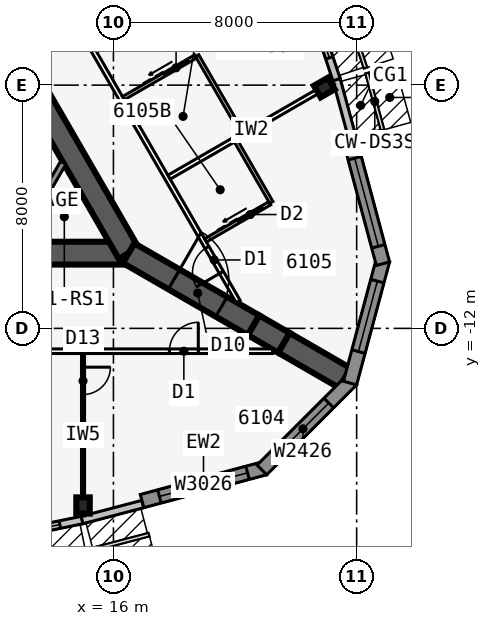
"""IFC4 building model, lengths in metres.
Left out: names, types, materials, properties, quantities, classifications, styles, units other than length and angle.
Written with IfcOpenShell. Run it as: python <this file> out.ifc"""

import sys

from ifc_helpers import new_model, si_unit, direction, frame, frame_2d, origin, origin_2d, place, context, subcontext, project, spatial, polyline, rectangle, i_section, outline, extrude, element, fill, save


model = new_model("IFC4")
c1 = context("Model", 3, precision=1e-05, world=origin(), true_north=direction((0.0, 1.0)))
c2 = subcontext(c1, "Body", "Model", "MODEL_VIEW")
j1 = project(units=[si_unit("LENGTHUNIT", "METRE"), si_unit("PLANEANGLEUNIT", "RADIAN")], contexts=[c1])
p1 = place(None, origin())
s1 = spatial("IfcSite", under=j1, at=p1, CompositionType="ELEMENT")
p2 = place(p1, origin())
s2 = spatial("IfcBuilding", under=s1, at=p2, CompositionType="ELEMENT")
p3 = place(p2, frame((0.0, 0.0, 229.7)))
s3 = spatial("IfcBuildingStorey", under=s2, at=p3, CompositionType="ELEMENT", Elevation=229.7)
p4 = place(p3, frame((-16.5, -9.526, 0.0), z_axis=(0.0, 0.0, 1.0), x_axis=(1.0, 0.0, 0.0)))
e1 = element("IfcWall", 1, at=p4, inside=s3, PredefinedType="SHEAR", context=c2, shape_type="SweptSolid", body=[
    extrude(rectangle(XDim=33.0, YDim=0.75, at=frame_2d((16.5, 0.0))), origin(), (0.0, 0.0, 1.0), 3.6),
])
p5 = place(p4, frame((14.05, 0.0, 0.0)))
e2 = element("IfcOpeningElement", 2, at=p5, cuts=e1, PredefinedType="OPENING", context=c2, shape_type="SweptSolid", body=[
    extrude(rectangle(XDim=1.8, YDim=2.13, at=frame_2d((0.9, 1.065))), frame((0.0, 0.385, 0.0), z_axis=(0.0, -1.0, 0.0), x_axis=(1.0, 0.0, 0.0)), (0.0, 0.0, 1.0), 0.77),
])
p6 = place(p3, frame((16.5, -9.526, 0.0), z_axis=(0.0, 0.0, 1.0), x_axis=(-0.499999749417, 0.866025548458, 0.0)))
e3 = element("IfcWall", 3, at=p6, inside=s3, PredefinedType="SHEAR", context=c2, shape_type="SweptSolid", body=[
    extrude(rectangle(XDim=33.0, YDim=0.75, at=frame_2d((16.5, 0.0))), origin(), (0.0, 0.0, 1.0), 3.6),
])
p7 = place(p6, frame((14.15, 0.0, 0.0)))
e4 = element("IfcOpeningElement", 4, at=p7, cuts=e3, PredefinedType="OPENING", context=c2, shape_type="SweptSolid", body=[
    extrude(rectangle(XDim=1.8, YDim=2.13, at=frame_2d((0.9, 1.065))), frame((0.0, 0.385, 0.0), z_axis=(0.0, -1.0, 0.0), x_axis=(1.0, 0.0, 0.0)), (0.0, 0.0, 1.0), 0.77),
])
p8 = place(p6, frame((12.6, 0.0, 0.0)))
e5 = element("IfcOpeningElement", 5, at=p8, cuts=e3, PredefinedType="OPENING", context=c2, shape_type="SweptSolid", body=[
    extrude(rectangle(XDim=1.0, YDim=2.13, at=frame_2d((0.5, 1.065))), frame((0.0, 0.385, 0.0), z_axis=(0.0, -1.0, 0.0), x_axis=(1.0, 0.0, 0.0)), (0.0, 0.0, 1.0), 0.77),
])
p9 = place(p3, frame((16.5, -9.526, 0.0), z_axis=(0.0, 0.0, 1.0), x_axis=(0.866031398331, -0.499989616998, 0.0)))
e6 = element("IfcWall", 6, at=p9, inside=s3, PredefinedType="SHEAR", context=c2, shape_type="SweptSolid", body=[
    extrude(rectangle(XDim=4.746, YDim=0.75, at=frame_2d((2.373, 0.0))), origin(), (0.0, 0.0, 1.0), 3.6),
])
p10 = place(p9, frame((1.725, 0.0, 0.0)))
e7 = element("IfcOpeningElement", 7, at=p10, cuts=e6, PredefinedType="OPENING", context=c2, shape_type="SweptSolid", body=[
    extrude(rectangle(XDim=1.8, YDim=2.13, at=frame_2d((0.9, 1.065))), frame((0.0, 0.385, 0.0), z_axis=(0.0, -1.0, 0.0), x_axis=(1.0, 0.0, 0.0)), (0.0, 0.0, 1.0), 0.77),
])
p11 = place(p3, frame((20.61, -11.899, 0.0), z_axis=(0.0, 0.0, 1.0), x_axis=(0.866009537788, -0.500027479704, 0.0)))
e8 = element("IfcWall", 8, at=p11, inside=s3, PredefinedType="SHEAR", context=c2, shape_type="SweptSolid", body=[
    extrude(rectangle(XDim=1.155, YDim=0.75, at=frame_2d((0.577, 0.0))), origin(), (0.0, 0.0, 1.0), 3.6),
])
p12 = place(p3, frame((21.61, -12.477, 0.0), z_axis=(0.0, 0.0, 1.0), x_axis=(0.866055313784, -0.499948190782, 0.0)))
e9 = element("IfcWall", 9, at=p12, inside=s3, PredefinedType="SHEAR", context=c2, shape_type="SweptSolid", body=[
    extrude(rectangle(XDim=2.309, YDim=0.75, at=frame_2d((1.155, 0.0))), origin(), (0.0, 0.0, 1.0), 3.6),
])
for number, where, z_axis, x_axis in (
    (10, (15.0, -17.825, 0.0), (0.0, 0.0, 1.0), (1.0, 0.0, 0.0)),
    (11, (22.937, -4.078, 0.0), (0.0, 0.0, 1.0), (-0.5, 0.866, 0.0)),
):
    element("IfcColumn", number, at=place(p3, frame(where, z_axis=z_axis, x_axis=x_axis)), inside=s3, PredefinedType="COLUMN", context=c2, shape_type="SweptSolid", body=[
        extrude(i_section(OverallWidth=0.442, OverallDepth=0.531, WebThickness=0.066, FlangeThickness=0.106, at=origin_2d()), origin(), (0.0, 0.0, 1.0), 3.6),
    ])
p13 = place(p3, frame((9.975, -19.332, 0.0), z_axis=(0.0, 0.0, 1.0), x_axis=(0.979461488189, 0.201631329795, 0.0)))
e12 = element("IfcWall", 12, at=p13, inside=s3, PredefinedType="STANDARD", context=c2, shape_type="SweptSolid", body=[
    extrude(rectangle(XDim=5.105, YDim=0.25, at=frame_2d((2.552, 0.0))), origin(), (0.0, 0.0, 1.0), 3.35),
])
p14 = place(p13, frame((0.752, 0.0, 0.45)))
e13 = element("IfcOpeningElement", 13, at=p14, cuts=e12, PredefinedType="OPENING", context=c2, shape_type="SweptSolid", body=[
    extrude(rectangle(XDim=3.6, YDim=2.6, at=frame_2d((1.8, 1.3))), frame((0.0, 0.135, 0.0), z_axis=(0.0, -1.0, 0.0), x_axis=(1.0, 0.0, 0.0)), (0.0, 0.0, 1.0), 0.27),
])
p15 = place(p3, frame((14.968, -18.304, 0.0), z_axis=(0.0, 0.0, 1.0), x_axis=(0.967010286052, 0.254737328772, 0.0)))
e14 = element("IfcWall", 14, at=p15, inside=s3, PredefinedType="STANDARD", context=c2, shape_type="SweptSolid", body=[
    extrude(rectangle(XDim=2.068, YDim=0.25, at=frame_2d((1.034, 0.0))), origin(), (0.0, 0.0, 1.0), 3.35),
])
p16 = place(p3, frame((16.942, -17.681, 0.0), z_axis=(0.0, 0.0, 1.0), x_axis=(0.965920442324, 0.258839137498, 0.0)))
e15 = element("IfcWall", 15, at=p16, inside=s3, PredefinedType="SOLIDWALL", context=c2, shape_type="SweptSolid", body=[
    extrude(rectangle(XDim=4.184, YDim=0.45, at=frame_2d((2.092, 0.0))), origin(), (0.0, 0.0, 1.0), 3.35),
])
p17 = place(p16, frame((0.592, 0.0, 0.45)))
e16 = element("IfcOpeningElement", 16, at=p17, cuts=e15, PredefinedType="OPENING", context=c2, shape_type="SweptSolid", body=[
    extrude(rectangle(XDim=3.0, YDim=2.6, at=frame_2d((1.5, 1.3))), frame((0.0, 0.235, 0.0), z_axis=(0.0, -1.0, 0.0), x_axis=(1.0, 0.0, 0.0)), (0.0, 0.0, 1.0), 0.47),
])
p18 = place(p3, frame((20.882, -16.656, 0.0), z_axis=(0.0, 0.0, 1.0), x_axis=(0.707077605902, 0.707135955267, 0.0)))
e17 = element("IfcWall", 17, at=p18, inside=s3, PredefinedType="SOLIDWALL", context=c2, shape_type="SweptSolid", body=[
    extrude(outline(polyline([(4.184, 0.225), (4.125, 0.225), (3.705, 0.113), (3.675, 0.225), (0.0, 0.225), (0.0, -0.225), (4.184, -0.225), (4.184, 0.225)])), origin(), (0.0, 0.0, 1.0), 3.35),
])
p19 = place(p18, frame((0.713, 0.0, 0.45)))
e18 = element("IfcOpeningElement", 18, at=p19, cuts=e17, PredefinedType="OPENING", context=c2, shape_type="SweptSolid", body=[
    extrude(rectangle(XDim=2.4, YDim=2.6, at=frame_2d((1.2, 1.3))), frame((0.0, 0.235, 0.0), z_axis=(0.0, -1.0, 0.0), x_axis=(1.0, 0.0, 0.0)), (0.0, 0.0, 1.0), 0.47),
])
p20 = place(p3, frame((23.783, -13.798, 0.0), z_axis=(0.0, 0.0, 1.0), x_axis=(0.258799282522, 0.96593112144, 0.0)))
e19 = element("IfcWall", 19, at=p20, inside=s3, PredefinedType="SOLIDWALL", context=c2, shape_type="SweptSolid", body=[
    extrude(outline(polyline([(4.184, 0.225), (0.509, 0.225), (0.479, 0.113), (0.059, 0.225), (0.0, 0.225), (0.0, -0.225), (4.184, -0.225), (4.184, 0.225)])), origin(), (0.0, 0.0, 1.0), 3.35),
])
p21 = place(p20, frame((1.071, 0.0, 0.45)))
e20 = element("IfcOpeningElement", 20, at=p21, cuts=e19, PredefinedType="OPENING", context=c2, shape_type="SweptSolid", body=[
    extrude(rectangle(XDim=2.4, YDim=2.6, at=frame_2d((1.2, 1.3))), frame((0.0, 0.235, 0.0), z_axis=(0.0, -1.0, 0.0), x_axis=(1.0, 0.0, 0.0)), (0.0, 0.0, 1.0), 0.47),
])
p22 = place(p3, frame((24.865, -9.873, 0.0), z_axis=(0.0, 0.0, 1.0), x_axis=(-0.258784695888, 0.965935029479, 0.0)))
e21 = element("IfcWall", 21, at=p22, inside=s3, PredefinedType="SOLIDWALL", context=c2, shape_type="SweptSolid", body=[
    extrude(rectangle(XDim=4.184, YDim=0.45, at=frame_2d((2.092, 0.0))), origin(), (0.0, 0.0, 1.0), 3.35),
])
p23 = place(p22, frame((0.592, 0.0, 0.45)))
e22 = element("IfcOpeningElement", 22, at=p23, cuts=e21, PredefinedType="OPENING", context=c2, shape_type="SweptSolid", body=[
    extrude(rectangle(XDim=3.0, YDim=2.6, at=frame_2d((1.5, 1.3))), frame((0.0, 0.235, 0.0), z_axis=(0.0, -1.0, 0.0), x_axis=(1.0, 0.0, 0.0)), (0.0, 0.0, 1.0), 0.47),
])
p24 = place(p3, frame((23.879, -5.806, 0.0), z_axis=(0.0, 0.0, 1.0), x_axis=(-0.262867703986, 0.964831887015, 0.0)))
e23 = element("IfcWall", 23, at=p24, inside=s3, PredefinedType="STANDARD", context=c2, shape_type="SweptSolid", body=[
    extrude(rectangle(XDim=2.068, YDim=0.25, at=frame_2d((1.034, 0.0))), origin(), (0.0, 0.0, 1.0), 3.35),
])
p25 = place(p3, frame((23.338, -3.817, 0.0), z_axis=(0.0, 0.0, 1.0), x_axis=(-0.315108478109, 0.949055660656, 0.0)))
e24 = element("IfcWall", 24, at=p25, inside=s3, PredefinedType="STANDARD", context=c2, shape_type="SweptSolid", body=[
    extrude(rectangle(XDim=5.105, YDim=0.25, at=frame_2d((2.552, 0.0))), origin(), (0.0, 0.0, 1.0), 3.35),
])
p26 = place(p25, frame((0.752, 0.0, 0.45)))
e25 = element("IfcOpeningElement", 25, at=p26, cuts=e24, PredefinedType="OPENING", context=c2, shape_type="SweptSolid", body=[
    extrude(rectangle(XDim=3.6, YDim=2.6, at=frame_2d((1.8, 1.3))), frame((0.0, 0.135, 0.0), z_axis=(0.0, -1.0, 0.0), x_axis=(1.0, 0.0, 0.0)), (0.0, 0.0, 1.0), 0.27),
])
p27 = place(p3, frame((-21.236, -12.751, 0.0), z_axis=(0.0, 0.0, 1.0), x_axis=(1.0, 0.0, 0.0)))
e26 = element("IfcWall", 26, at=p27, inside=s3, PredefinedType="PARTITIONING", context=c2, shape_type="SweptSolid", body=[
    extrude(rectangle(XDim=42.472, YDim=0.15, at=frame_2d((21.236, 0.0))), origin(), (0.0, 0.0, 1.0), 3.35),
])
p28 = place(p27, frame((2.444, 0.0, 0.0)))
e27 = element("IfcOpeningElement", 27, at=p28, cuts=e26, PredefinedType="OPENING", context=c2, shape_type="SweptSolid", body=[
    extrude(rectangle(XDim=0.95, YDim=2.13, at=frame_2d((0.475, 1.065))), frame((0.0, 0.085, 0.0), z_axis=(0.0, -1.0, 0.0), x_axis=(1.0, 0.0, 0.0)), (0.0, 0.0, 1.0), 0.17),
])
p29 = place(p27, frame((13.261, 0.0, 0.0)))
e28 = element("IfcOpeningElement", 28, at=p29, cuts=e26, PredefinedType="OPENING", context=c2, shape_type="SweptSolid", body=[
    extrude(rectangle(XDim=0.95, YDim=2.13, at=frame_2d((0.475, 1.065))), frame((0.0, 0.085, 0.0), z_axis=(0.0, -1.0, 0.0), x_axis=(1.0, 0.0, 0.0)), (0.0, 0.0, 1.0), 0.17),
])
p30 = place(p27, frame((23.236, 0.0, 0.0)))
e29 = element("IfcOpeningElement", 29, at=p30, cuts=e26, PredefinedType="OPENING", context=c2, shape_type="SweptSolid", body=[
    extrude(rectangle(XDim=1.0, YDim=2.13, at=frame_2d((0.5, 1.065))), frame((0.0, 0.085, 0.0), z_axis=(0.0, -1.0, 0.0), x_axis=(1.0, 0.0, 0.0)), (0.0, 0.0, 1.0), 0.17),
])
p31 = place(p27, frame((29.461, 0.0, 0.0)))
e30 = element("IfcOpeningElement", 30, at=p31, cuts=e26, PredefinedType="OPENING", context=c2, shape_type="SweptSolid", body=[
    extrude(rectangle(XDim=0.95, YDim=2.13, at=frame_2d((0.475, 1.065))), frame((0.0, 0.085, 0.0), z_axis=(0.0, -1.0, 0.0), x_axis=(1.0, 0.0, 0.0)), (0.0, 0.0, 1.0), 0.17),
])
p32 = place(p27, frame((39.077, 0.0, 0.0)))
e31 = element("IfcOpeningElement", 31, at=p32, cuts=e26, PredefinedType="OPENING", context=c2, shape_type="SweptSolid", body=[
    extrude(rectangle(XDim=0.95, YDim=2.13, at=frame_2d((0.475, 1.065))), frame((0.0, 0.085, 0.0), z_axis=(0.0, -1.0, 0.0), x_axis=(1.0, 0.0, 0.0)), (0.0, 0.0, 1.0), 0.17),
])
p33 = place(p3, frame((15.0, -12.826, 0.0), z_axis=(0.0, 0.0, 1.0), x_axis=(0.0, -1.0, 0.0)))
e32 = element("IfcWall", 32, at=p33, inside=s3, PredefinedType="PARTITIONING", context=c2, shape_type="SweptSolid", body=[
    extrude(rectangle(XDim=5.34, YDim=0.1, at=frame_2d((2.67, 0.0))), origin(), (0.0, 0.0, 1.0), 2.25),
])
p34 = place(p33, frame((0.45, 0.0, 0.0)))
e33 = element("IfcOpeningElement", 33, at=p34, cuts=e32, PredefinedType="OPENING", context=c2, shape_type="SweptSolid", body=[
    extrude(rectangle(XDim=0.9, YDim=2.13, at=frame_2d((0.45, 1.065))), frame((0.0, 0.06, 0.0), z_axis=(0.0, -1.0, 0.0), x_axis=(1.0, 0.0, 0.0)), (0.0, 0.0, 1.0), 0.12),
])
p35 = place(p3, frame((20.102, -11.115, 0.0), z_axis=(0.0, 0.0, 1.0), x_axis=(-0.500000265775, 0.866025250339, 0.0)))
e34 = element("IfcWall", 34, at=p35, inside=s3, PredefinedType="PARTITIONING", context=c2, shape_type="SweptSolid", body=[
    extrude(rectangle(XDim=39.354, YDim=0.15, at=frame_2d((19.677, 0.0))), origin(), (0.0, 0.0, 1.0), 3.35),
])
p36 = place(p35, frame((1.102, 0.0, 0.0)))
e35 = element("IfcOpeningElement", 35, at=p36, cuts=e34, PredefinedType="OPENING", context=c2, shape_type="SweptSolid", body=[
    extrude(rectangle(XDim=0.95, YDim=2.13, at=frame_2d((0.475, 1.065))), frame((0.0, 0.085, 0.0), z_axis=(0.0, -1.0, 0.0), x_axis=(1.0, 0.0, 0.0)), (0.0, 0.0, 1.0), 0.17),
])
p37 = place(p35, frame((11.702, 0.0, 0.0)))
e36 = element("IfcOpeningElement", 36, at=p37, cuts=e34, PredefinedType="OPENING", context=c2, shape_type="SweptSolid", body=[
    extrude(rectangle(XDim=0.95, YDim=2.13, at=frame_2d((0.475, 1.065))), frame((0.0, 0.085, 0.0), z_axis=(0.0, -1.0, 0.0), x_axis=(1.0, 0.0, 0.0)), (0.0, 0.0, 1.0), 0.17),
])
p38 = place(p35, frame((26.702, 0.0, 0.0)))
e37 = element("IfcOpeningElement", 37, at=p38, cuts=e34, PredefinedType="OPENING", context=c2, shape_type="SweptSolid", body=[
    extrude(rectangle(XDim=0.95, YDim=2.13, at=frame_2d((0.475, 1.065))), frame((0.0, 0.085, 0.0), z_axis=(0.0, -1.0, 0.0), x_axis=(1.0, 0.0, 0.0)), (0.0, 0.0, 1.0), 0.17),
])
p39 = place(p35, frame((37.302, 0.0, 0.0)))
e38 = element("IfcOpeningElement", 38, at=p39, cuts=e34, PredefinedType="OPENING", context=c2, shape_type="SweptSolid", body=[
    extrude(rectangle(XDim=0.95, YDim=2.13, at=frame_2d((0.475, 1.065))), frame((0.0, 0.085, 0.0), z_axis=(0.0, -1.0, 0.0), x_axis=(1.0, 0.0, 0.0)), (0.0, 0.0, 1.0), 0.17),
])
p40 = place(p3, frame((17.829, -7.027, 0.0), z_axis=(0.0, 0.0, 1.0), x_axis=(0.866026604282, 0.499997920671, 0.0)))
e39 = element("IfcWall", 39, at=p40, inside=s3, PredefinedType="PARTITIONING", context=c2, shape_type="SweptSolid", body=[
    extrude(rectangle(XDim=6.24, YDim=0.15, at=frame_2d((3.12, 0.0))), origin(), (0.0, 0.0, 1.0), 2.25),
])
p41 = place(p3, frame((21.194, -7.856, 0.0), z_axis=(0.0, 0.0, 1.0), x_axis=(-0.500033551112, 0.866006032174, 0.0)))
e40 = element("IfcWall", 40, at=p41, inside=s3, PredefinedType="PLUMBINGWALL", context=c2, shape_type="SweptSolid", body=[
    extrude(rectangle(XDim=2.4, YDim=0.12, at=frame_2d((1.2, 0.0))), origin(), (0.0, 0.0, 1.0), 3.35),
])
p42 = place(p3, frame((19.029, -9.106, 0.0), z_axis=(0.0, 0.0, 1.0), x_axis=(0.866023955769, 0.500002508028, 0.0)))
e41 = element("IfcWall", 41, at=p42, inside=s3, PredefinedType="PLUMBINGWALL", context=c2, shape_type="SweptSolid", body=[
    extrude(rectangle(XDim=2.44, YDim=0.12, at=frame_2d((1.22, 0.0))), origin(), (0.0, 0.0, 1.0), 3.35),
])
p43 = place(p42, frame((1.25, 0.0, 0.0)))
e42 = element("IfcOpeningElement", 42, at=p43, cuts=e41, PredefinedType="OPENING", context=c2, shape_type="SweptSolid", body=[
    extrude(rectangle(XDim=0.9, YDim=2.13, at=frame_2d((0.45, 1.065))), frame((0.0, 0.07, 0.0), z_axis=(0.0, -1.0, 0.0), x_axis=(1.0, 0.0, 0.0)), (0.0, 0.0, 1.0), 0.14),
])
p44 = place(p3, frame((20.253, -5.627, 0.0), z_axis=(0.0, 0.0, 1.0), x_axis=(-0.50002537861, 0.866010750942, 0.0)))
e43 = element("IfcWall", 43, at=p44, inside=s3, PredefinedType="PLUMBINGWALL", context=c2, shape_type="SweptSolid", body=[
    extrude(rectangle(XDim=3.0, YDim=0.12, at=frame_2d((1.5, 0.0))), origin(), (0.0, 0.0, 1.0), 3.35),
])
p45 = place(p3, frame((16.329, -4.429, 0.0), z_axis=(0.0, 0.0, 1.0), x_axis=(0.865997131366, 0.500048966069, 0.0)))
e44 = element("IfcWall", 44, at=p45, inside=s3, PredefinedType="PLUMBINGWALL", context=c2, shape_type="SweptSolid", body=[
    extrude(rectangle(XDim=2.74, YDim=0.12, at=frame_2d((1.37, 0.0))), origin(), (0.0, 0.0, 1.0), 3.35),
])
p46 = place(p45, frame((1.55, 0.0, 0.0)))
e45 = element("IfcOpeningElement", 45, at=p46, cuts=e44, PredefinedType="OPENING", context=c2, shape_type="SweptSolid", body=[
    extrude(rectangle(XDim=0.9, YDim=2.13, at=frame_2d((0.45, 1.065))), frame((0.0, 0.07, 0.0), z_axis=(0.0, -1.0, 0.0), x_axis=(1.0, 0.0, 0.0)), (0.0, 0.0, 1.0), 0.14),
])
p47 = place(p3, frame((14.349, -6.551, 0.0), z_axis=(0.0, 0.0, 1.0), x_axis=(-0.499952404951, -0.866052881055, 0.0)))
e46 = element("IfcWall", 46, at=p47, inside=s3, PredefinedType="SOLIDWALL", context=c2, shape_type="SweptSolid", body=[
    extrude(rectangle(XDim=3.002, YDim=0.2, at=frame_2d((1.501, 0.0))), origin(), (0.0, 0.0, 1.0), 3.35),
])
p48 = place(p14, origin())
e47 = element("IfcWindow", 47, at=p48, inside=s3, PartitioningType="SINGLE_PANEL", PredefinedType="WINDOW", context=c2, shape_type="SweptSolid", body=[
    extrude(rectangle(XDim=3.6, YDim=2.6, at=frame_2d((1.8, 1.3))), frame((0.0, 0.03, 0.0), z_axis=(0.0, -1.0, 0.0), x_axis=(1.0, 0.0, 0.0)), (0.0, 0.0, 1.0), 0.06),
])
fill(e13, e47)
p49 = place(p17, origin())
e48 = element("IfcWindow", 48, at=p49, inside=s3, PartitioningType="SINGLE_PANEL", PredefinedType="WINDOW", context=c2, shape_type="SweptSolid", body=[
    extrude(rectangle(XDim=3.0, YDim=2.6, at=frame_2d((1.5, 1.3))), frame((0.0, 0.03, 0.0), z_axis=(0.0, -1.0, 0.0), x_axis=(1.0, 0.0, 0.0)), (0.0, 0.0, 1.0), 0.06),
])
fill(e16, e48)
p50 = place(p19, origin())
e49 = element("IfcWindow", 49, at=p50, inside=s3, PartitioningType="SINGLE_PANEL", PredefinedType="WINDOW", context=c2, shape_type="SweptSolid", body=[
    extrude(rectangle(XDim=2.4, YDim=2.6, at=frame_2d((1.2, 1.3))), frame((0.0, 0.03, 0.0), z_axis=(0.0, -1.0, 0.0), x_axis=(1.0, 0.0, 0.0)), (0.0, 0.0, 1.0), 0.06),
])
fill(e18, e49)
p51 = place(p21, origin())
e50 = element("IfcWindow", 50, at=p51, inside=s3, PartitioningType="SINGLE_PANEL", PredefinedType="WINDOW", context=c2, shape_type="SweptSolid", body=[
    extrude(rectangle(XDim=2.4, YDim=2.6, at=frame_2d((1.2, 1.3))), frame((0.0, 0.03, 0.0), z_axis=(0.0, -1.0, 0.0), x_axis=(1.0, 0.0, 0.0)), (0.0, 0.0, 1.0), 0.06),
])
fill(e20, e50)
p52 = place(p23, origin())
e51 = element("IfcWindow", 51, at=p52, inside=s3, PartitioningType="SINGLE_PANEL", PredefinedType="WINDOW", context=c2, shape_type="SweptSolid", body=[
    extrude(rectangle(XDim=3.0, YDim=2.6, at=frame_2d((1.5, 1.3))), frame((0.0, 0.03, 0.0), z_axis=(0.0, -1.0, 0.0), x_axis=(1.0, 0.0, 0.0)), (0.0, 0.0, 1.0), 0.06),
])
fill(e22, e51)
p53 = place(p26, origin())
e52 = element("IfcWindow", 52, at=p53, inside=s3, PartitioningType="SINGLE_PANEL", PredefinedType="WINDOW", context=c2, shape_type="SweptSolid", body=[
    extrude(rectangle(XDim=3.6, YDim=2.6, at=frame_2d((1.8, 1.3))), frame((0.0, 0.03, 0.0), z_axis=(0.0, -1.0, 0.0), x_axis=(1.0, 0.0, 0.0)), (0.0, 0.0, 1.0), 0.06),
])
fill(e25, e52)
p54 = place(p34, origin())
e53 = element("IfcDoor", 53, at=p54, inside=s3, OperationType="SINGLE_SWING_LEFT", PredefinedType="DOOR", context=c2, shape_type="SweptSolid", body=[
    extrude(rectangle(XDim=0.9, YDim=2.13, at=frame_2d((0.45, 1.065))), frame((0.0, 0.025, 0.0), z_axis=(0.0, -1.0, 0.0), x_axis=(1.0, 0.0, 0.0)), (0.0, 0.0, 1.0), 0.05),
])
fill(e33, e53)
p55 = place(p32, origin())
e54 = element("IfcDoor", 54, at=p55, inside=s3, OperationType="SINGLE_SWING_RIGHT", PredefinedType="DOOR", context=c2, shape_type="SweptSolid", body=[
    extrude(rectangle(XDim=0.95, YDim=2.13, at=frame_2d((0.475, 1.065))), frame((0.0, 0.025, 0.0), z_axis=(0.0, -1.0, 0.0), x_axis=(1.0, 0.0, 0.0)), (0.0, 0.0, 1.0), 0.05),
])
fill(e31, e54)
p56 = place(p43, origin())
e55 = element("IfcDoor", 55, at=p56, inside=s3, OperationType="SLIDING_TO_LEFT", PredefinedType="DOOR", context=c2, shape_type="SweptSolid", body=[
    extrude(rectangle(XDim=0.9, YDim=2.13, at=frame_2d((0.45, 1.065))), frame((0.0, 0.025, 0.0), z_axis=(0.0, -1.0, 0.0), x_axis=(1.0, 0.0, 0.0)), (0.0, 0.0, 1.0), 0.05),
])
fill(e42, e55)
p57 = place(p36, origin())
e56 = element("IfcDoor", 56, at=p57, inside=s3, OperationType="SINGLE_SWING_LEFT", PredefinedType="DOOR", context=c2, shape_type="SweptSolid", body=[
    extrude(rectangle(XDim=0.95, YDim=2.13, at=frame_2d((0.475, 1.065))), frame((0.0, 0.025, 0.0), z_axis=(0.0, -1.0, 0.0), x_axis=(1.0, 0.0, 0.0)), (0.0, 0.0, 1.0), 0.05),
])
fill(e35, e56)
p58 = place(p46, origin())
e57 = element("IfcDoor", 57, at=p58, inside=s3, OperationType="SLIDING_TO_LEFT", PredefinedType="DOOR", context=c2, shape_type="SweptSolid", body=[
    extrude(rectangle(XDim=0.9, YDim=2.13, at=frame_2d((0.45, 1.065))), frame((0.0, 0.025, 0.0), z_axis=(0.0, -1.0, 0.0), x_axis=(1.0, 0.0, 0.0)), (0.0, 0.0, 1.0), 0.05),
])
fill(e45, e57)
p59 = place(p10, origin())
e58 = element("IfcDoor", 58, at=p59, inside=s3, OperationType="DOUBLE_DOOR_DOUBLE_SWING", PredefinedType="DOOR", context=c2, shape_type="SweptSolid", body=[
    extrude(rectangle(XDim=1.8, YDim=2.13, at=frame_2d((0.9, 1.065))), frame((0.0, 0.025, 0.0), z_axis=(0.0, -1.0, 0.0), x_axis=(1.0, 0.0, 0.0)), (0.0, 0.0, 1.0), 0.05),
])
fill(e7, e58)
save(model, sys.argv[1])
